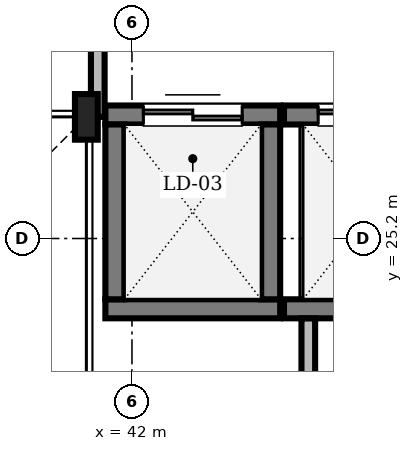
"""IFC4 building model, lengths in metres.
Left out: names, types, materials, properties, quantities, classifications, styles, units other than length and angle.
Written with IfcOpenShell. Run it as: python <this file> out.ifc"""

import sys

from ifc_helpers import new_model, si_unit, direction, frame, frame_2d, origin, origin_2d, place, context, subcontext, project, spatial, rectangle, i_section, extrude, source, transform, mapped, element, fill, save


model = new_model("IFC4")
c1 = context("Model", 3, precision=1e-05, world=origin(), true_north=direction((0.0, 1.0)))
c2 = subcontext(c1, "Body", "Model", "MODEL_VIEW")
j1 = project(units=[si_unit("LENGTHUNIT", "METRE"), si_unit("PLANEANGLEUNIT", "RADIAN")], contexts=[c1])
p1 = place(None, origin())
s1 = spatial("IfcSite", under=j1, at=p1, CompositionType="ELEMENT")
p2 = place(p1, origin())
s2 = spatial("IfcBuilding", under=s1, at=p2, CompositionType="ELEMENT")
p3 = place(p2, frame((0.0, 0.0, 291.15)))
s3 = spatial("IfcBuildingStorey", under=s2, at=p3, CompositionType="ELEMENT", Elevation=291.15)
m1 = source(origin(), c2, "Body", "SweptSolid", [
    extrude(i_section(OverallWidth=0.3, OverallDepth=0.6, WebThickness=0.015, FlangeThickness=0.03, FilletRadius=0.027, at=origin_2d()), origin(), (0.0, 0.0, 1.0), 4.7),
])
p4 = place(p3, frame((41.4, 26.8, 0.0), z_axis=(0.0, 0.0, 1.0), x_axis=(1.0, 0.0, 0.0)))
e1 = element("IfcColumn", 1, at=p4, inside=s3, PredefinedType="COLUMN", context=c2, shape_type="MappedRepresentation", body=[
    mapped(m1, transform((0.0, 0.0, 0.0), scale=1.0)),
])
m2 = source(origin(), c2, "Body", "SweptSolid", [
    extrude(rectangle(XDim=2.3, YDim=0.25, at=frame_2d((1.15, 0.0))), origin(), (0.0, 0.0, 1.0), 4.7),
])
p5 = place(p3, frame((41.65, 24.275, 0.0), z_axis=(0.0, 0.0, 1.0), x_axis=(1.0, 0.0, 0.0)))
e2 = element("IfcWall", 2, at=p5, inside=s3, PredefinedType="SOLIDWALL", context=c2, shape_type="MappedRepresentation", body=[
    mapped(m2, transform((0.0, 0.0, 0.0), scale=1.0)),
])
p6 = place(p3, frame((41.65, 26.825, 0.0), z_axis=(0.0, 0.0, 1.0), x_axis=(1.0, 0.0, 0.0)))
e3 = element("IfcWall", 3, at=p6, inside=s3, PredefinedType="SOLIDWALL", context=c2, shape_type="MappedRepresentation", body=[
    mapped(m2, transform((0.0, 0.0, 0.0), scale=1.0)),
])
m3 = source(origin(), c2, "Body", "SweptSolid", [
    extrude(rectangle(XDim=1.3, YDim=2.3, at=frame_2d((0.65, 1.15))), frame((0.0, 0.135, 0.0), z_axis=(0.0, -1.0, 0.0), x_axis=(1.0, 0.0, 0.0)), (0.0, 0.0, 1.0), 0.27),
])
p7 = place(p6, frame((0.5, 0.0, 0.0)))
e4 = element("IfcOpeningElement", 4, at=p7, cuts=e3, PredefinedType="OPENING", context=c2, shape_type="MappedRepresentation", body=[
    mapped(m3, transform((0.0, 0.0, 0.0), scale=1.0)),
])
for number, where, z_axis, x_axis in (
    (5, (41.775, 24.4, 0.0), (0.0, 0.0, 1.0), (0.0, 1.0, 0.0)),
    (6, (43.825, 24.4, 0.0), (0.0, 0.0, 1.0), (0.0, 1.0, 0.0)),
):
    element("IfcWall", number, at=place(p3, frame(where, z_axis=z_axis, x_axis=x_axis)), inside=s3, PredefinedType="SOLIDWALL", context=c2, shape_type="MappedRepresentation", body=[
        mapped(m2, transform((0.0, 0.0, 0.0), scale=1.0)),
    ])
m4 = source(origin(), c2, "Body", "SweptSolid", [
    extrude(rectangle(XDim=2.2, YDim=0.25, at=frame_2d((1.1, 0.0))), origin(), (0.0, 0.0, 1.0), 4.7),
])
p8 = place(p3, frame((44.0, 24.275, 0.0), z_axis=(0.0, 0.0, 1.0), x_axis=(1.0, 0.0, 0.0)))
e7 = element("IfcWall", 7, at=p8, inside=s3, PredefinedType="SOLIDWALL", context=c2, shape_type="MappedRepresentation", body=[
    mapped(m4, transform((0.0, 0.0, 0.0), scale=1.0)),
])
p9 = place(p3, frame((44.0, 26.825, 0.0), z_axis=(0.0, 0.0, 1.0), x_axis=(1.0, 0.0, 0.0)))
e8 = element("IfcWall", 8, at=p9, inside=s3, PredefinedType="SOLIDWALL", context=c2, shape_type="MappedRepresentation", body=[
    mapped(m4, transform((0.0, 0.0, 0.0), scale=1.0)),
])
p10 = place(p9, frame((0.45, 0.0, 0.0)))
e9 = element("IfcOpeningElement", 9, at=p10, cuts=e8, PredefinedType="OPENING", context=c2, shape_type="MappedRepresentation", body=[
    mapped(m3, transform((0.0, 0.0, 0.0), scale=1.0)),
])
m5 = source(origin(), c2, "Body", "SweptSolid", [
    extrude(rectangle(XDim=6.788, YDim=0.18, at=frame_2d((3.394, 0.0))), origin(), (0.0, 0.0, 1.0), 4.142),
])
p11 = place(p3, frame((44.32, 17.36, 0.0), z_axis=(0.0, 0.0, 1.0), x_axis=(0.0, 1.0, 0.0)))
e10 = element("IfcWall", 10, at=p11, inside=s3, PredefinedType="PARTITIONING", context=c2, shape_type="MappedRepresentation", body=[
    mapped(m5, transform((0.0, 0.0, 0.0), scale=1.0)),
])
m6 = source(origin(), c2, "Body", "SweptSolid", [
    extrude(rectangle(XDim=2.35, YDim=0.18, at=frame_2d((1.175, 0.0))), origin(), (0.0, 0.0, 1.0), 4.332),
])
p12 = place(p3, frame((41.55, 26.8, 0.0), z_axis=(0.0, 0.0, 1.0), x_axis=(0.0, 1.0, 0.0)))
e11 = element("IfcWall", 11, at=p12, inside=s3, PredefinedType="PARTITIONING", context=c2, shape_type="MappedRepresentation", body=[
    mapped(m6, transform((0.0, 0.0, 0.0), scale=1.0)),
])
m7 = source(origin(), c2, "Body", "SweptSolid", [
    extrude(rectangle(XDim=1.3, YDim=2.3, at=frame_2d((0.65, 1.15))), frame((0.0, 0.025, 0.0), z_axis=(0.0, -1.0, 0.0), x_axis=(1.0, 0.0, 0.0)), (0.0, 0.0, 1.0), 0.05),
])
p13 = place(p7, origin())
e12 = element("IfcDoor", 12, at=p13, inside=s3, OperationType="DOUBLE_DOOR_SLIDING", PredefinedType="DOOR", context=c2, shape_type="MappedRepresentation", body=[
    mapped(m7, transform((0.0, 0.0, 0.0), scale=1.0)),
])
fill(e4, e12)
p14 = place(p10, origin())
e13 = element("IfcDoor", 13, at=p14, inside=s3, OperationType="DOUBLE_DOOR_SLIDING", PredefinedType="DOOR", context=c2, shape_type="MappedRepresentation", body=[
    mapped(m7, transform((0.0, 0.0, 0.0), scale=1.0)),
])
fill(e9, e13)
save(model, sys.argv[1])
